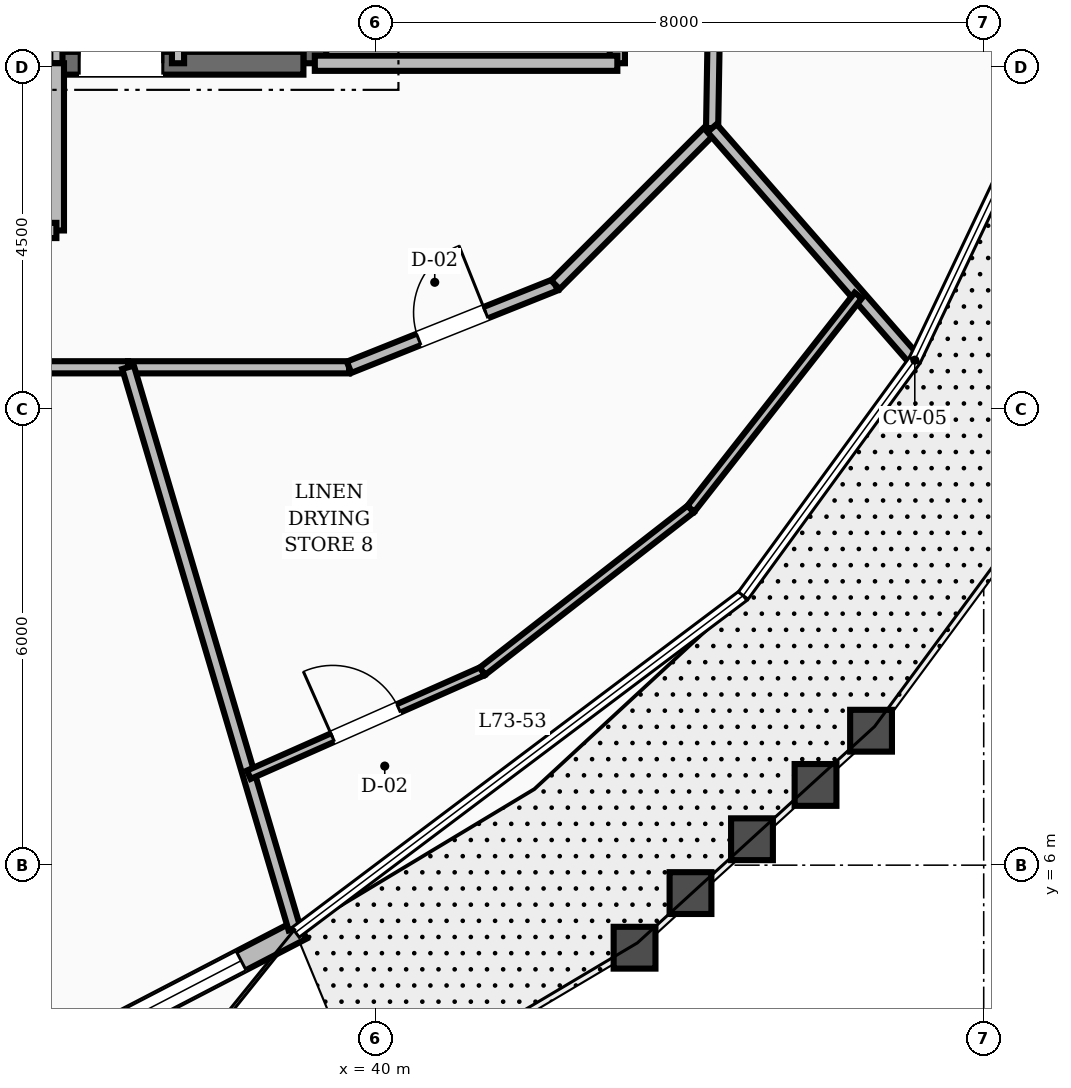
"""IFC4 building model, lengths in metres.
Left out: names, types, materials, properties, quantities, classifications, styles, units other than length and angle.
Written with IfcOpenShell. Run it as: python <this file> out.ifc"""

import sys

from ifc_helpers import new_model, si_unit, direction, frame, frame_2d, origin, place, context, subcontext, project, spatial, rectangle, extrude, element, fill, save


model = new_model("IFC4")
c1 = context("Model", 3, precision=1e-05, world=origin(), true_north=direction((0.0, 1.0)))
c2 = subcontext(c1, "Body", "Model", "MODEL_VIEW")
j1 = project(units=[si_unit("LENGTHUNIT", "METRE"), si_unit("PLANEANGLEUNIT", "RADIAN")], contexts=[c1])
p1 = place(None, origin())
s1 = spatial("IfcSite", under=j1, at=p1, CompositionType="ELEMENT")
p2 = place(p1, origin())
s2 = spatial("IfcBuilding", under=s1, at=p2, CompositionType="ELEMENT")
p3 = place(p2, frame((0.0, 0.0, 279.6)))
s3 = spatial("IfcBuildingStorey", under=s2, at=p3, CompositionType="ELEMENT", Elevation=279.6)
p4 = place(p3, frame((39.2, 16.55, 0.0), z_axis=(0.0, 0.0, 1.0), x_axis=(0.0, 1.0, 0.0)))
e1 = element("IfcWall", 1, at=p4, inside=s3, PredefinedType="SHEAR", context=c2, shape_type="SweptSolid", body=[
    extrude(rectangle(XDim=6.3, YDim=0.3, at=frame_2d((3.15, 0.0))), origin(), (0.0, 0.0, 1.0), 3.6),
])
p5 = place(p3, frame((35.8, 16.55, 0.0), z_axis=(0.0, 0.0, 1.0), x_axis=(1.0, 0.0, 0.0)))
e2 = element("IfcWall", 2, at=p5, inside=s3, PredefinedType="SHEAR", context=c2, shape_type="SweptSolid", body=[
    extrude(rectangle(XDim=3.25, YDim=0.3, at=frame_2d((1.625, 0.0))), origin(), (0.0, 0.0, 1.0), 3.6),
])
p6 = place(p5, frame((0.3, 0.0, 0.0)))
e3 = element("IfcOpeningElement", 3, at=p6, cuts=e2, PredefinedType="OPENING", context=c2, shape_type="SweptSolid", body=[
    extrude(rectangle(XDim=1.1, YDim=2.1, at=frame_2d((0.55, 1.05))), frame((0.0, 0.16, 0.0), z_axis=(0.0, -1.0, 0.0), x_axis=(1.0, 0.0, 0.0)), (0.0, 0.0, 1.0), 0.32),
])
p7 = place(p3, frame((35.651, 3.403, 0.0), z_axis=(0.0, 0.0, 1.0), x_axis=(0.88737951992, 0.461039681184, 0.0)))
e4 = element("IfcWall", 4, at=p7, inside=s3, PredefinedType="STANDARD", context=c2, shape_type="SweptSolid", body=[
    extrude(rectangle(XDim=3.806, YDim=0.28, at=frame_2d((1.903, 0.0))), origin(), (0.0, 0.0, 1.0), 2.88),
])
p8 = place(p7, frame((0.807, 0.0, 0.8)))
e5 = element("IfcOpeningElement", 5, at=p8, cuts=e4, PredefinedType="OPENING", context=c2, shape_type="SweptSolid", body=[
    extrude(rectangle(XDim=2.1, YDim=1.65, at=frame_2d((1.05, 0.825))), frame((0.0, 0.15, 0.0), z_axis=(0.0, -1.0, 0.0), x_axis=(1.0, 0.0, 0.0)), (0.0, 0.0, 1.0), 0.3),
])
p9 = place(p3, frame((43.18, 16.55, 0.0), z_axis=(0.0, 0.0, 1.0), x_axis=(0.0, 1.0, 0.0)))
e6 = element("IfcWall", 6, at=p9, inside=s3, PredefinedType="SOLIDWALL", context=c2, shape_type="SweptSolid", body=[
    extrude(rectangle(XDim=2.73, YDim=0.2, at=frame_2d((1.365, 0.0))), origin(), (0.0, 0.0, 1.0), 2.87),
])
p10 = place(p9, frame((0.89, 0.0, 0.0)))
e7 = element("IfcOpeningElement", 7, at=p10, cuts=e6, PredefinedType="OPENING", context=c2, shape_type="SweptSolid", body=[
    extrude(rectangle(XDim=0.95, YDim=2.1, at=frame_2d((0.475, 1.05))), frame((0.0, 0.11, 0.0), z_axis=(0.0, -1.0, 0.0), x_axis=(1.0, 0.0, 0.0)), (0.0, 0.0, 1.0), 0.22),
])
p11 = place(p3, frame((39.2, 16.55, 0.0), z_axis=(0.0, 0.0, 1.0), x_axis=(1.0, 0.0, 0.0)))
e8 = element("IfcWall", 8, at=p11, inside=s3, PredefinedType="SOLIDWALL", context=c2, shape_type="SweptSolid", body=[
    extrude(rectangle(XDim=3.98, YDim=0.2, at=frame_2d((1.99, 0.0))), origin(), (0.0, 0.0, 1.0), 2.87),
])
p12 = place(p3, frame((35.8, 16.55, 0.0), z_axis=(0.0, 0.0, 1.0), x_axis=(0.0, 1.0, 0.0)))
e9 = element("IfcWall", 9, at=p12, inside=s3, PredefinedType="SOLIDWALL", context=c2, shape_type="SweptSolid", body=[
    extrude(rectangle(XDim=3.3, YDim=0.16, at=frame_2d((1.65, 0.0))), origin(), (0.0, 0.0, 1.0), 2.87),
])
p13 = place(p3, frame((37.4, 16.55, 0.0), z_axis=(0.0, 0.0, 1.0), x_axis=(0.0, 1.0, 0.0)))
e10 = element("IfcWall", 10, at=p13, inside=s3, PredefinedType="SOLIDWALL", context=c2, shape_type="SweptSolid", body=[
    extrude(rectangle(XDim=1.75, YDim=0.16, at=frame_2d((0.875, 0.0))), origin(), (0.0, 0.0, 1.0), 2.87),
])
p14 = place(p3, frame((35.8, 14.35, 0.0), z_axis=(0.0, 0.0, 1.0), x_axis=(0.0, 1.0, 0.0)))
e11 = element("IfcWall", 11, at=p14, inside=s3, PredefinedType="SOLIDWALL", context=c2, shape_type="SweptSolid", body=[
    extrude(rectangle(XDim=2.2, YDim=0.2, at=frame_2d((1.1, 0.0))), origin(), (0.0, 0.0, 1.0), 2.87),
])
p15 = place(p3, frame((28.2, 14.35, 0.0), z_axis=(0.0, 0.0, 1.0), x_axis=(1.0, 0.0, 0.0)))
e12 = element("IfcWall", 12, at=p15, inside=s3, PredefinedType="SOLIDWALL", context=c2, shape_type="SweptSolid", body=[
    extrude(rectangle(XDim=7.6, YDim=0.2, at=frame_2d((3.8, 0.0))), origin(), (0.0, 0.0, 1.0), 2.87),
])
p16 = place(p15, frame((3.2, 0.0, 0.0)))
e13 = element("IfcOpeningElement", 13, at=p16, cuts=e12, PredefinedType="OPENING", context=c2, shape_type="SweptSolid", body=[
    extrude(rectangle(XDim=1.2, YDim=2.1, at=frame_2d((0.6, 1.05))), frame((0.0, 0.11, 0.0), z_axis=(0.0, -1.0, 0.0), x_axis=(1.0, 0.0, 0.0)), (0.0, 0.0, 1.0), 0.22),
])
p17 = place(p3, frame((34.278, 12.55, 0.0), z_axis=(0.0, 0.0, 1.0), x_axis=(1.0, 0.0, 0.0)))
e14 = element("IfcWall", 14, at=p17, inside=s3, PredefinedType="SOLIDWALL", context=c2, shape_type="SweptSolid", body=[
    extrude(rectangle(XDim=2.465, YDim=0.16, at=frame_2d((1.232, 0.0))), origin(), (0.0, 0.0, 1.0), 2.87),
])
p18 = place(p3, frame((36.743, 12.55, 0.0), z_axis=(0.0, 0.0, 1.0), x_axis=(1.0, 0.0, 0.0)))
e15 = element("IfcWall", 15, at=p18, inside=s3, PredefinedType="SOLIDWALL", context=c2, shape_type="SweptSolid", body=[
    extrude(rectangle(XDim=2.908, YDim=0.16, at=frame_2d((1.454, 0.0))), origin(), (0.0, 0.0, 1.0), 2.87),
])
p19 = place(p3, frame((39.651, 12.55, 0.0), z_axis=(0.0, 0.0, 1.0), x_axis=(0.92856882165, 0.371160266542, 0.0)))
e16 = element("IfcWall", 16, at=p19, inside=s3, PredefinedType="SOLIDWALL", context=c2, shape_type="SweptSolid", body=[
    extrude(rectangle(XDim=2.923, YDim=0.16, at=frame_2d((1.461, 0.0))), origin(), (0.0, 0.0, 1.0), 2.87),
])
p20 = place(p19, frame((0.987, 0.0, 0.0)))
e17 = element("IfcOpeningElement", 17, at=p20, cuts=e16, PredefinedType="OPENING", context=c2, shape_type="SweptSolid", body=[
    extrude(rectangle(XDim=0.95, YDim=2.1, at=frame_2d((0.475, 1.05))), frame((0.0, 0.09, 0.0), z_axis=(0.0, -1.0, 0.0), x_axis=(1.0, 0.0, 0.0)), (0.0, 0.0, 1.0), 0.18),
])
p21 = place(p3, frame((42.365, 13.635, 0.0), z_axis=(0.0, 0.0, 1.0), x_axis=(0.707106781187, 0.707106781187, 0.0)))
e18 = element("IfcWall", 18, at=p21, inside=s3, PredefinedType="SOLIDWALL", context=c2, shape_type="SweptSolid", body=[
    extrude(rectangle(XDim=2.916, YDim=0.16, at=frame_2d((1.458, 0.0))), origin(), (0.0, 0.0, 1.0), 2.87),
])
p22 = place(p3, frame((44.427, 15.697, 0.0), z_axis=(0.0, 0.0, 1.0), x_axis=(0.016981035134, 0.999855811828, 0.0)))
e19 = element("IfcWall", 19, at=p22, inside=s3, PredefinedType="SOLIDWALL", context=c2, shape_type="SweptSolid", body=[
    extrude(rectangle(XDim=3.134, YDim=0.16, at=frame_2d((1.567, 0.0))), origin(), (0.0, 0.0, 1.0), 2.87),
])
p23 = place(p3, frame((44.427, 15.697, 0.0), z_axis=(0.0, 0.0, 1.0), x_axis=(0.657843835953, -0.753154358348, 0.0)))
e20 = element("IfcWall", 20, at=p23, inside=s3, PredefinedType="SOLIDWALL", context=c2, shape_type="SweptSolid", body=[
    extrude(rectangle(XDim=4.004, YDim=0.16, at=frame_2d((2.002, 0.0))), origin(), (0.0, 0.0, 1.0), 2.87),
])
p24 = place(p3, frame((36.743, 12.55, 0.0), z_axis=(0.0, 0.0, 1.0), x_axis=(0.28423289616, -0.958755266343, 0.0)))
e21 = element("IfcWall", 21, at=p24, inside=s3, PredefinedType="SOLIDWALL", context=c2, shape_type="SweptSolid", body=[
    extrude(rectangle(XDim=7.705, YDim=0.16, at=frame_2d((3.853, 0.0))), origin(), (0.0, 0.0, 1.0), 2.87),
])
p25 = place(p3, frame((38.332, 7.19, 0.0), z_axis=(0.0, 0.0, 1.0), x_axis=(0.91429599521, 0.405046704891, 0.0)))
e22 = element("IfcWall", 22, at=p25, inside=s3, PredefinedType="PARTITIONING", context=c2, shape_type="SweptSolid", body=[
    extrude(rectangle(XDim=3.362, YDim=0.12, at=frame_2d((1.681, 0.0))), origin(), (0.0, 0.0, 1.0), 2.87),
])
p26 = place(p25, frame((1.206, 0.0, 0.0)))
e23 = element("IfcOpeningElement", 23, at=p26, cuts=e22, PredefinedType="OPENING", context=c2, shape_type="SweptSolid", body=[
    extrude(rectangle(XDim=0.95, YDim=2.1, at=frame_2d((0.475, 1.05))), frame((0.0, 0.07, 0.0), z_axis=(0.0, -1.0, 0.0), x_axis=(1.0, 0.0, 0.0)), (0.0, 0.0, 1.0), 0.14),
])
p27 = place(p3, frame((41.406, 8.552, 0.0), z_axis=(0.0, 0.0, 1.0), x_axis=(0.78881842994, 0.614626296694, 0.0)))
e24 = element("IfcWall", 24, at=p27, inside=s3, PredefinedType="PARTITIONING", context=c2, shape_type="SweptSolid", body=[
    extrude(rectangle(XDim=3.474, YDim=0.12, at=frame_2d((1.737, 0.0))), origin(), (0.0, 0.0, 1.0), 2.87),
])
p28 = place(p3, frame((44.146, 10.687, 0.0), z_axis=(0.0, 0.0, 1.0), x_axis=(0.617150729588, 0.786844951035, 0.0)))
e25 = element("IfcWall", 25, at=p28, inside=s3, PredefinedType="PARTITIONING", context=c2, shape_type="SweptSolid", body=[
    extrude(rectangle(XDim=3.569, YDim=0.12, at=frame_2d((1.785, 0.0))), origin(), (0.0, 0.0, 1.0), 2.87),
])
p29 = place(p8, origin())
e26 = element("IfcWindow", 26, at=p29, inside=s3, PartitioningType="SINGLE_PANEL", PredefinedType="WINDOW", context=c2, shape_type="SweptSolid", body=[
    extrude(rectangle(XDim=2.1, YDim=1.65, at=frame_2d((1.05, 0.825))), frame((0.0, 0.03, 0.0), z_axis=(0.0, -1.0, 0.0), x_axis=(1.0, 0.0, 0.0)), (0.0, 0.0, 1.0), 0.06),
])
fill(e5, e26)
p30 = place(p6, origin())
e27 = element("IfcDoor", 27, at=p30, inside=s3, OperationType="SINGLE_SWING_RIGHT", PredefinedType="DOOR", context=c2, shape_type="SweptSolid", body=[
    extrude(rectangle(XDim=1.1, YDim=2.1, at=frame_2d((0.55, 1.05))), frame((0.0, 0.025, 0.0), z_axis=(0.0, -1.0, 0.0), x_axis=(1.0, 0.0, 0.0)), (0.0, 0.0, 1.0), 0.05),
])
fill(e3, e27)
p31 = place(p20, origin())
e28 = element("IfcDoor", 28, at=p31, inside=s3, OperationType="SINGLE_SWING_RIGHT", PredefinedType="DOOR", context=c2, shape_type="SweptSolid", body=[
    extrude(rectangle(XDim=0.95, YDim=2.1, at=frame_2d((0.475, 1.05))), frame((0.0, 0.025, 0.0), z_axis=(0.0, -1.0, 0.0), x_axis=(1.0, 0.0, 0.0)), (0.0, 0.0, 1.0), 0.05),
])
fill(e17, e28)
p32 = place(p26, origin())
e29 = element("IfcDoor", 29, at=p32, inside=s3, OperationType="SINGLE_SWING_LEFT", PredefinedType="DOOR", context=c2, shape_type="SweptSolid", body=[
    extrude(rectangle(XDim=0.95, YDim=2.1, at=frame_2d((0.475, 1.05))), frame((0.0, 0.025, 0.0), z_axis=(0.0, -1.0, 0.0), x_axis=(1.0, 0.0, 0.0)), (0.0, 0.0, 1.0), 0.05),
])
fill(e23, e29)
save(model, sys.argv[1])
